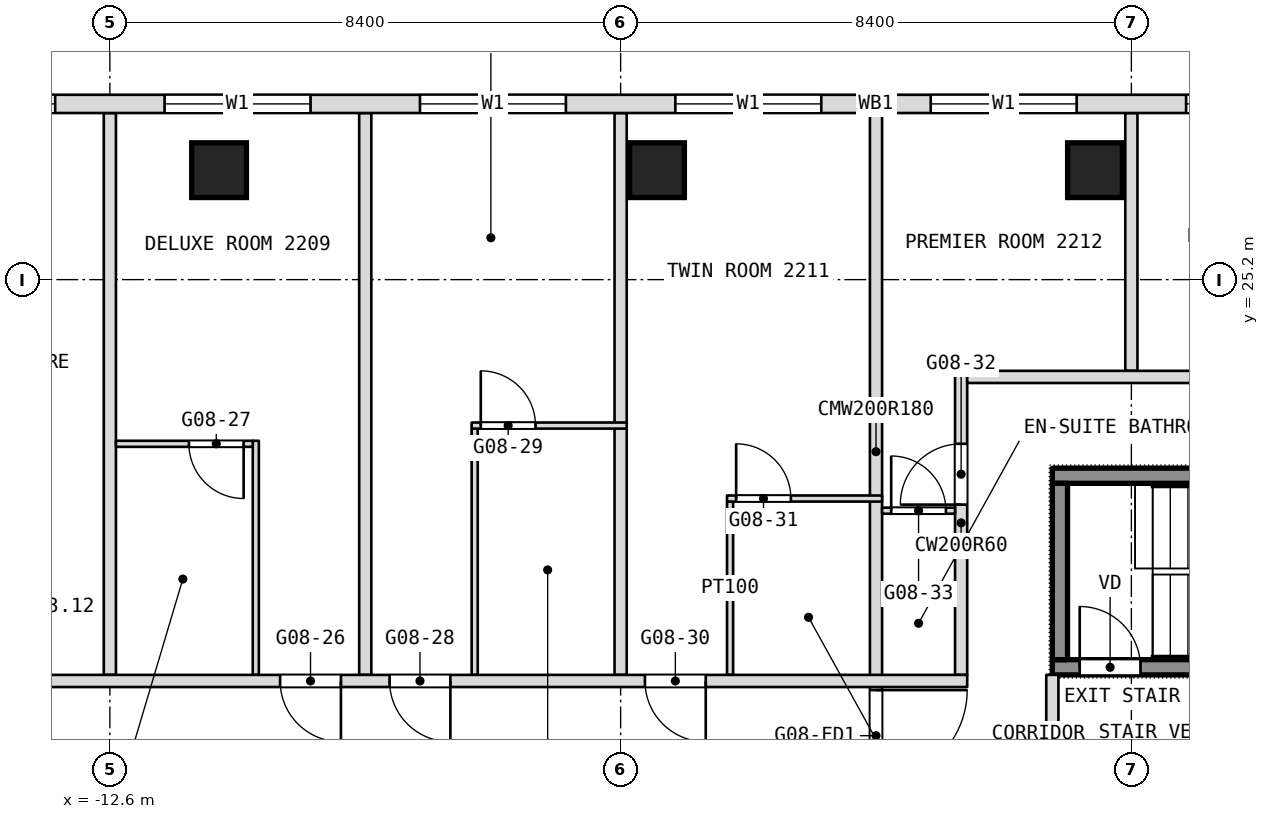
"""IFC4 building model, lengths in metres.
Left out: names, types, materials, properties, quantities, classifications, styles, units other than length and angle.
Written with IfcOpenShell. Run it as: python <this file> out.ifc"""

import sys

from ifc_helpers import new_model, si_unit, direction, frame, frame_2d, origin, origin_2d, place, context, subcontext, project, spatial, rectangle, extrude, element, fill, save


model = new_model("IFC4")
c1 = context("Model", 3, precision=1e-05, world=origin(), true_north=direction((0.0, 1.0)))
c2 = subcontext(c1, "Body", "Model", "MODEL_VIEW")
j1 = project(units=[si_unit("LENGTHUNIT", "METRE"), si_unit("PLANEANGLEUNIT", "RADIAN")], contexts=[c1])
p1 = place(None, origin())
s1 = spatial("IfcSite", under=j1, at=p1, CompositionType="ELEMENT")
p2 = place(p1, origin())
s2 = spatial("IfcBuilding", under=s1, at=p2, CompositionType="ELEMENT")
p3 = place(p2, frame((0.0, 0.0, 104.9)))
s3 = spatial("IfcBuildingStorey", under=s2, at=p3, CompositionType="ELEMENT", Elevation=104.9)
for number, where, z_axis, x_axis in (
    (1, (-10.804, 27.0, 0.0), (0.0, 0.0, 1.0), (1.0, 0.0, 0.0)),
    (2, (-3.601, 27.0, 0.0), (0.0, 0.0, 1.0), (1.0, 0.0, 0.0)),
    (3, (3.601, 27.0, 0.0), (0.0, 0.0, 1.0), (1.0, 0.0, 0.0)),
):
    element("IfcColumn", number, at=place(p3, frame(where, z_axis=z_axis, x_axis=x_axis)), inside=s3, PredefinedType="COLUMN", context=c2, shape_type="SweptSolid", body=[
        extrude(rectangle(XDim=0.9, YDim=0.9, at=origin_2d()), origin(), (0.0, 0.0, 1.0), 3.6),
    ])
p4 = place(p3, frame((4.2, 23.7, 0.0), z_axis=(0.0, 0.0, 1.0), x_axis=(0.0, 1.0, 0.0)))
e4 = element("IfcWall", 4, at=p4, inside=s3, PredefinedType="PARTITIONING", context=c2, shape_type="SweptSolid", body=[
    extrude(rectangle(XDim=4.24, YDim=0.2, at=frame_2d((2.12, 0.0))), origin(), (0.0, 0.0, 1.0), 3.34),
])
p5 = place(p3, frame((2.9, 16.9, 0.0), z_axis=(0.0, 0.0, 1.0), x_axis=(0.0, 1.0, 0.0)))
e5 = element("IfcWall", 5, at=p5, inside=s3, PredefinedType="PARTITIONING", context=c2, shape_type="SweptSolid", body=[
    extrude(rectangle(XDim=1.8, YDim=0.2, at=frame_2d((0.9, 0.0))), origin(), (0.0, 0.0, 1.0), 3.34),
])
p6 = place(p3, frame((1.4, 18.7, 0.0), z_axis=(0.0, 0.0, 1.0), x_axis=(0.0, 1.0, 0.0)))
e6 = element("IfcWall", 6, at=p6, inside=s3, PredefinedType="PARTITIONING", context=c2, shape_type="SweptSolid", body=[
    extrude(rectangle(XDim=5.0, YDim=0.2, at=frame_2d((2.5, 0.0))), origin(), (0.0, 0.0, 1.0), 3.34),
])
p7 = place(p6, frame((2.8, 0.0, 0.0)))
e7 = element("IfcOpeningElement", 7, at=p7, cuts=e6, PredefinedType="OPENING", context=c2, shape_type="SweptSolid", body=[
    extrude(rectangle(XDim=1.0, YDim=2.1, at=frame_2d((0.5, 1.05))), frame((0.0, 0.1, 0.0), z_axis=(0.0, -1.0, 0.0), x_axis=(1.0, 0.0, 0.0)), (0.0, 0.0, 1.0), 0.2),
])
p8 = place(p3, frame((0.0, 16.8, 0.0), z_axis=(0.0, 0.0, 1.0), x_axis=(0.0, 1.0, 0.0)))
e8 = element("IfcWall", 8, at=p8, inside=s3, PredefinedType="PARTITIONING", context=c2, shape_type="SweptSolid", body=[
    extrude(rectangle(XDim=11.14, YDim=0.2, at=frame_2d((5.57, 0.0))), origin(), (0.0, 0.0, 1.0), 3.34),
])
p9 = place(p8, frame((0.15, 0.0, 0.0)))
e9 = element("IfcOpeningElement", 9, at=p9, cuts=e8, PredefinedType="OPENING", context=c2, shape_type="SweptSolid", body=[
    extrude(rectangle(XDim=1.5, YDim=2.1, at=frame_2d((0.75, 1.05))), frame((0.0, 0.1, 0.0), z_axis=(0.0, -1.0, 0.0), x_axis=(1.0, 0.0, 0.0)), (0.0, 0.0, 1.0), 0.2),
])
p10 = place(p3, frame((-2.4, 18.7, 0.0), z_axis=(0.0, 0.0, 1.0), x_axis=(0.0, 1.0, 0.0)))
e10 = element("IfcWall", 10, at=p10, inside=s3, PredefinedType="PARTITIONING", context=c2, shape_type="SweptSolid", body=[
    extrude(rectangle(XDim=2.85, YDim=0.1, at=frame_2d((1.425, 0.0))), origin(), (0.0, 0.0, 1.0), 3.34),
])
p11 = place(p3, frame((-4.2, 18.7, 0.0), z_axis=(0.0, 0.0, 1.0), x_axis=(0.0, 1.0, 0.0)))
e11 = element("IfcWall", 11, at=p11, inside=s3, PredefinedType="PARTITIONING", context=c2, shape_type="SweptSolid", body=[
    extrude(rectangle(XDim=9.24, YDim=0.2, at=frame_2d((4.62, 0.0))), origin(), (0.0, 0.0, 1.0), 3.34),
])
p12 = place(p3, frame((-6.6, 18.7, 0.0), z_axis=(0.0, 0.0, 1.0), x_axis=(0.0, 1.0, 0.0)))
e12 = element("IfcWall", 12, at=p12, inside=s3, PredefinedType="PARTITIONING", context=c2, shape_type="SweptSolid", body=[
    extrude(rectangle(XDim=4.05, YDim=0.1, at=frame_2d((2.025, 0.0))), origin(), (0.0, 0.0, 1.0), 3.34),
])
p13 = place(p3, frame((-8.4, 18.7, 0.0), z_axis=(0.0, 0.0, 1.0), x_axis=(0.0, 1.0, 0.0)))
e13 = element("IfcWall", 13, at=p13, inside=s3, PredefinedType="PARTITIONING", context=c2, shape_type="SweptSolid", body=[
    extrude(rectangle(XDim=9.24, YDim=0.2, at=frame_2d((4.62, 0.0))), origin(), (0.0, 0.0, 1.0), 3.34),
])
p14 = place(p3, frame((-10.2, 18.7, 0.0), z_axis=(0.0, 0.0, 1.0), x_axis=(0.0, 1.0, 0.0)))
e14 = element("IfcWall", 14, at=p14, inside=s3, PredefinedType="PARTITIONING", context=c2, shape_type="SweptSolid", body=[
    extrude(rectangle(XDim=3.85, YDim=0.1, at=frame_2d((1.925, 0.0))), origin(), (0.0, 0.0, 1.0), 3.34),
])
p15 = place(p3, frame((-12.6, 18.7, 0.0), z_axis=(0.0, 0.0, 1.0), x_axis=(0.0, 1.0, 0.0)))
e15 = element("IfcWall", 15, at=p15, inside=s3, PredefinedType="PARTITIONING", context=c2, shape_type="SweptSolid", body=[
    extrude(rectangle(XDim=9.24, YDim=0.2, at=frame_2d((4.62, 0.0))), origin(), (0.0, 0.0, 1.0), 3.34),
])
p16 = place(p3, frame((-16.9, 18.6, 0.0), z_axis=(0.0, 0.0, 1.0), x_axis=(1.0, 0.0, 0.0)))
e16 = element("IfcWall", 16, at=p16, inside=s3, PredefinedType="PARTITIONING", context=c2, shape_type="SweptSolid", body=[
    extrude(rectangle(XDim=18.4, YDim=0.2, at=frame_2d((9.2, 0.0))), origin(), (0.0, 0.0, 1.0), 3.34),
])
p17 = place(p16, frame((1.7, 0.0, 0.0)))
e17 = element("IfcOpeningElement", 17, at=p17, cuts=e16, PredefinedType="OPENING", context=c2, shape_type="SweptSolid", body=[
    extrude(rectangle(XDim=1.0, YDim=2.1, at=frame_2d((0.5, 1.05))), frame((0.0, 0.1, 0.0), z_axis=(0.0, -1.0, 0.0), x_axis=(1.0, 0.0, 0.0)), (0.0, 0.0, 1.0), 0.2),
])
p18 = place(p16, frame((7.1, 0.0, 0.0)))
e18 = element("IfcOpeningElement", 18, at=p18, cuts=e16, PredefinedType="OPENING", context=c2, shape_type="SweptSolid", body=[
    extrude(rectangle(XDim=1.0, YDim=2.1, at=frame_2d((0.5, 1.05))), frame((0.0, 0.1, 0.0), z_axis=(0.0, -1.0, 0.0), x_axis=(1.0, 0.0, 0.0)), (0.0, 0.0, 1.0), 0.2),
])
p19 = place(p16, frame((8.9, 0.0, 0.0)))
e19 = element("IfcOpeningElement", 19, at=p19, cuts=e16, PredefinedType="OPENING", context=c2, shape_type="SweptSolid", body=[
    extrude(rectangle(XDim=1.0, YDim=2.1, at=frame_2d((0.5, 1.05))), frame((0.0, 0.1, 0.0), z_axis=(0.0, -1.0, 0.0), x_axis=(1.0, 0.0, 0.0)), (0.0, 0.0, 1.0), 0.2),
])
p20 = place(p16, frame((13.1, 0.0, 0.0)))
e20 = element("IfcOpeningElement", 20, at=p20, cuts=e16, PredefinedType="OPENING", context=c2, shape_type="SweptSolid", body=[
    extrude(rectangle(XDim=1.0, YDim=2.1, at=frame_2d((0.5, 1.05))), frame((0.0, 0.1, 0.0), z_axis=(0.0, -1.0, 0.0), x_axis=(1.0, 0.0, 0.0)), (0.0, 0.0, 1.0), 0.2),
])
p21 = place(p3, frame((0.1, 21.4, 0.0), z_axis=(0.0, 0.0, 1.0), x_axis=(1.0, 0.0, 0.0)))
e21 = element("IfcWall", 21, at=p21, inside=s3, PredefinedType="PARTITIONING", context=c2, shape_type="SweptSolid", body=[
    extrude(rectangle(XDim=1.2, YDim=0.1, at=frame_2d((0.6, 0.0))), origin(), (0.0, 0.0, 1.0), 3.34),
])
p22 = place(p21, frame((0.15, 0.0, 0.0)))
e22 = element("IfcOpeningElement", 22, at=p22, cuts=e21, PredefinedType="OPENING", context=c2, shape_type="SweptSolid", body=[
    extrude(rectangle(XDim=0.9, YDim=2.1, at=frame_2d((0.45, 1.05))), frame((0.0, 0.05, 0.0), z_axis=(0.0, -1.0, 0.0), x_axis=(1.0, 0.0, 0.0)), (0.0, 0.0, 1.0), 0.1),
])
p23 = place(p3, frame((-2.45, 21.6, 0.0), z_axis=(0.0, 0.0, 1.0), x_axis=(1.0, 0.0, 0.0)))
e23 = element("IfcWall", 23, at=p23, inside=s3, PredefinedType="PARTITIONING", context=c2, shape_type="SweptSolid", body=[
    extrude(rectangle(XDim=2.55, YDim=0.1, at=frame_2d((1.275, 0.0))), origin(), (0.0, 0.0, 1.0), 3.34),
])
p24 = place(p23, frame((0.15, 0.0, 0.0)))
e24 = element("IfcOpeningElement", 24, at=p24, cuts=e23, PredefinedType="OPENING", context=c2, shape_type="SweptSolid", body=[
    extrude(rectangle(XDim=0.9, YDim=2.1, at=frame_2d((0.45, 1.05))), frame((0.0, 0.05, 0.0), z_axis=(0.0, -1.0, 0.0), x_axis=(1.0, 0.0, 0.0)), (0.0, 0.0, 1.0), 0.1),
])
p25 = place(p3, frame((-12.5, 22.5, 0.0), z_axis=(0.0, 0.0, 1.0), x_axis=(1.0, 0.0, 0.0)))
e25 = element("IfcWall", 25, at=p25, inside=s3, PredefinedType="PARTITIONING", context=c2, shape_type="SweptSolid", body=[
    extrude(rectangle(XDim=2.25, YDim=0.1, at=frame_2d((1.125, 0.0))), origin(), (0.0, 0.0, 1.0), 3.34),
])
p26 = place(p25, frame((1.2, 0.0, 0.0)))
e26 = element("IfcOpeningElement", 26, at=p26, cuts=e25, PredefinedType="OPENING", context=c2, shape_type="SweptSolid", body=[
    extrude(rectangle(XDim=0.9, YDim=2.1, at=frame_2d((0.45, 1.05))), frame((0.0, 0.05, 0.0), z_axis=(0.0, -1.0, 0.0), x_axis=(1.0, 0.0, 0.0)), (0.0, 0.0, 1.0), 0.1),
])
p27 = place(p3, frame((-6.65, 22.8, 0.0), z_axis=(0.0, 0.0, 1.0), x_axis=(1.0, 0.0, 0.0)))
e27 = element("IfcWall", 27, at=p27, inside=s3, PredefinedType="PARTITIONING", context=c2, shape_type="SweptSolid", body=[
    extrude(rectangle(XDim=2.55, YDim=0.1, at=frame_2d((1.275, 0.0))), origin(), (0.0, 0.0, 1.0), 3.34),
])
p28 = place(p27, frame((0.15, 0.0, 0.0)))
e28 = element("IfcOpeningElement", 28, at=p28, cuts=e27, PredefinedType="OPENING", context=c2, shape_type="SweptSolid", body=[
    extrude(rectangle(XDim=0.9, YDim=2.1, at=frame_2d((0.45, 1.05))), frame((0.0, 0.05, 0.0), z_axis=(0.0, -1.0, 0.0), x_axis=(1.0, 0.0, 0.0)), (0.0, 0.0, 1.0), 0.1),
])
p29 = place(p3, frame((1.5, 23.6, 0.0), z_axis=(0.0, 0.0, 1.0), x_axis=(1.0, 0.0, 0.0)))
e29 = element("IfcWall", 29, at=p29, inside=s3, PredefinedType="PARTITIONING", context=c2, shape_type="SweptSolid", body=[
    extrude(rectangle(XDim=9.2, YDim=0.2, at=frame_2d((4.6, 0.0))), origin(), (0.0, 0.0, 1.0), 3.34),
])
p30 = place(p29, frame((6.0, 0.0, 0.0)))
e30 = element("IfcOpeningElement", 30, at=p30, cuts=e29, PredefinedType="OPENING", context=c2, shape_type="SweptSolid", body=[
    extrude(rectangle(XDim=1.8, YDim=2.1, at=frame_2d((0.9, 1.05))), frame((0.0, 0.1, 0.0), z_axis=(0.0, -1.0, 0.0), x_axis=(1.0, 0.0, 0.0)), (0.0, 0.0, 1.0), 0.2),
])
p31 = place(p3, frame((21.306, 28.09, 0.0), z_axis=(0.0, 0.0, 1.0), x_axis=(-1.0, 0.0, 0.0)))
e31 = element("IfcWall", 31, at=p31, inside=s3, PredefinedType="NOTDEFINED", context=c2, shape_type="SweptSolid", body=[
    extrude(rectangle(XDim=42.612, YDim=0.3, at=frame_2d((21.306, 0.0))), origin(), (0.0, 0.0, 1.0), 3.6),
])
p32 = place(p31, frame((5.406, 0.0, 0.9)))
e32 = element("IfcOpeningElement", 32, at=p32, cuts=e31, PredefinedType="OPENING", context=c2, shape_type="SweptSolid", body=[
    extrude(rectangle(XDim=2.4, YDim=2.1, at=frame_2d((1.2, 1.05))), frame((0.0, 0.15, 0.0), z_axis=(0.0, -1.0, 0.0), x_axis=(1.0, 0.0, 0.0)), (0.0, 0.0, 1.0), 0.3),
])
p33 = place(p31, frame((9.606, 0.0, 0.9)))
e33 = element("IfcOpeningElement", 33, at=p33, cuts=e31, PredefinedType="OPENING", context=c2, shape_type="SweptSolid", body=[
    extrude(rectangle(XDim=2.4, YDim=2.1, at=frame_2d((1.2, 1.05))), frame((0.0, 0.15, 0.0), z_axis=(0.0, -1.0, 0.0), x_axis=(1.0, 0.0, 0.0)), (0.0, 0.0, 1.0), 0.3),
])
p34 = place(p31, frame((13.806, 0.0, 0.9)))
e34 = element("IfcOpeningElement", 34, at=p34, cuts=e31, PredefinedType="OPENING", context=c2, shape_type="SweptSolid", body=[
    extrude(rectangle(XDim=2.4, YDim=2.1, at=frame_2d((1.2, 1.05))), frame((0.0, 0.15, 0.0), z_axis=(0.0, -1.0, 0.0), x_axis=(1.0, 0.0, 0.0)), (0.0, 0.0, 1.0), 0.3),
])
p35 = place(p31, frame((18.006, 0.0, 0.9)))
e35 = element("IfcOpeningElement", 35, at=p35, cuts=e31, PredefinedType="OPENING", context=c2, shape_type="SweptSolid", body=[
    extrude(rectangle(XDim=2.4, YDim=2.1, at=frame_2d((1.2, 1.05))), frame((0.0, 0.15, 0.0), z_axis=(0.0, -1.0, 0.0), x_axis=(1.0, 0.0, 0.0)), (0.0, 0.0, 1.0), 0.3),
])
p36 = place(p31, frame((22.206, 0.0, 0.9)))
e36 = element("IfcOpeningElement", 36, at=p36, cuts=e31, PredefinedType="OPENING", context=c2, shape_type="SweptSolid", body=[
    extrude(rectangle(XDim=2.4, YDim=2.1, at=frame_2d((1.2, 1.05))), frame((0.0, 0.15, 0.0), z_axis=(0.0, -1.0, 0.0), x_axis=(1.0, 0.0, 0.0)), (0.0, 0.0, 1.0), 0.3),
])
p37 = place(p31, frame((26.406, 0.0, 0.9)))
e37 = element("IfcOpeningElement", 37, at=p37, cuts=e31, PredefinedType="OPENING", context=c2, shape_type="SweptSolid", body=[
    extrude(rectangle(XDim=2.4, YDim=2.1, at=frame_2d((1.2, 1.05))), frame((0.0, 0.15, 0.0), z_axis=(0.0, -1.0, 0.0), x_axis=(1.0, 0.0, 0.0)), (0.0, 0.0, 1.0), 0.3),
])
p38 = place(p31, frame((30.606, 0.0, 0.9)))
e38 = element("IfcOpeningElement", 38, at=p38, cuts=e31, PredefinedType="OPENING", context=c2, shape_type="SweptSolid", body=[
    extrude(rectangle(XDim=2.4, YDim=2.1, at=frame_2d((1.2, 1.05))), frame((0.0, 0.15, 0.0), z_axis=(0.0, -1.0, 0.0), x_axis=(1.0, 0.0, 0.0)), (0.0, 0.0, 1.0), 0.3),
])
p39 = place(p31, frame((34.806, 0.0, 0.9)))
e39 = element("IfcOpeningElement", 39, at=p39, cuts=e31, PredefinedType="OPENING", context=c2, shape_type="SweptSolid", body=[
    extrude(rectangle(XDim=2.4, YDim=2.1, at=frame_2d((1.2, 1.05))), frame((0.0, 0.15, 0.0), z_axis=(0.0, -1.0, 0.0), x_axis=(1.0, 0.0, 0.0)), (0.0, 0.0, 1.0), 0.3),
])
p40 = place(p3, frame((2.9, 18.825, 0.1), z_axis=(0.0, 0.0, 1.0), x_axis=(1.0, 0.0, 0.0)))
e40 = element("IfcWall", 40, at=p40, inside=s3, PredefinedType="SHEAR", context=c2, shape_type="SweptSolid", body=[
    extrude(rectangle(XDim=6.2, YDim=0.25, at=frame_2d((3.1, 0.0))), origin(), (0.0, 0.0, 1.0), 3.6),
])
p41 = place(p40, frame((0.45, 0.0, 0.0)))
e41 = element("IfcOpeningElement", 41, at=p41, cuts=e40, PredefinedType="OPENING", context=c2, shape_type="SweptSolid", body=[
    extrude(rectangle(XDim=1.0, YDim=2.1, at=frame_2d((0.5, 1.05))), frame((0.0, 0.125, 0.0), z_axis=(0.0, -1.0, 0.0), x_axis=(1.0, 0.0, 0.0)), (0.0, 0.0, 1.0), 0.25),
])
p42 = place(p3, frame((2.9, 21.975, 0.1), z_axis=(0.0, 0.0, 1.0), x_axis=(1.0, 0.0, 0.0)))
e42 = element("IfcWall", 42, at=p42, inside=s3, PredefinedType="SHEAR", context=c2, shape_type="SweptSolid", body=[
    extrude(rectangle(XDim=6.2, YDim=0.25, at=frame_2d((3.1, 0.0))), origin(), (0.0, 0.0, 1.0), 3.6),
])
p43 = place(p3, frame((3.025, 18.95, 0.1), z_axis=(0.0, 0.0, 1.0), x_axis=(0.0, 1.0, 0.0)))
e43 = element("IfcWall", 43, at=p43, inside=s3, PredefinedType="SHEAR", context=c2, shape_type="SweptSolid", body=[
    extrude(rectangle(XDim=2.9, YDim=0.25, at=frame_2d((1.45, 0.0))), origin(), (0.0, 0.0, 1.0), 3.6),
])
p44 = place(p7, origin())
e44 = element("IfcDoor", 44, at=p44, inside=s3, OperationType="SINGLE_SWING_RIGHT", PredefinedType="DOOR", context=c2, shape_type="SweptSolid", body=[
    extrude(rectangle(XDim=1.0, YDim=2.1, at=frame_2d((0.5, 1.05))), frame((0.0, 0.025, 0.0), z_axis=(0.0, -1.0, 0.0), x_axis=(1.0, 0.0, 0.0)), (0.0, 0.0, 1.0), 0.05),
])
fill(e7, e44)
p45 = place(p18, origin())
e45 = element("IfcDoor", 45, at=p45, inside=s3, OperationType="SINGLE_SWING_LEFT", PredefinedType="DOOR", context=c2, shape_type="SweptSolid", body=[
    extrude(rectangle(XDim=1.0, YDim=2.1, at=frame_2d((0.5, 1.05))), frame((0.0, 0.025, 0.0), z_axis=(0.0, -1.0, 0.0), x_axis=(1.0, 0.0, 0.0)), (0.0, 0.0, 1.0), 0.05),
])
fill(e18, e45)
p46 = place(p19, origin())
e46 = element("IfcDoor", 46, at=p46, inside=s3, OperationType="SINGLE_SWING_LEFT", PredefinedType="DOOR", context=c2, shape_type="SweptSolid", body=[
    extrude(rectangle(XDim=1.0, YDim=2.1, at=frame_2d((0.5, 1.05))), frame((0.0, 0.025, 0.0), z_axis=(0.0, -1.0, 0.0), x_axis=(1.0, 0.0, 0.0)), (0.0, 0.0, 1.0), 0.05),
])
fill(e19, e46)
p47 = place(p20, origin())
e47 = element("IfcDoor", 47, at=p47, inside=s3, OperationType="SINGLE_SWING_LEFT", PredefinedType="DOOR", context=c2, shape_type="SweptSolid", body=[
    extrude(rectangle(XDim=1.0, YDim=2.1, at=frame_2d((0.5, 1.05))), frame((0.0, 0.025, 0.0), z_axis=(0.0, -1.0, 0.0), x_axis=(1.0, 0.0, 0.0)), (0.0, 0.0, 1.0), 0.05),
])
fill(e20, e47)
p48 = place(p22, origin())
e48 = element("IfcDoor", 48, at=p48, inside=s3, OperationType="SINGLE_SWING_LEFT", PredefinedType="DOOR", context=c2, shape_type="SweptSolid", body=[
    extrude(rectangle(XDim=0.9, YDim=2.1, at=frame_2d((0.45, 1.05))), frame((0.0, 0.025, 0.0), z_axis=(0.0, -1.0, 0.0), x_axis=(1.0, 0.0, 0.0)), (0.0, 0.0, 1.0), 0.05),
])
fill(e22, e48)
p49 = place(p24, origin())
e49 = element("IfcDoor", 49, at=p49, inside=s3, OperationType="SINGLE_SWING_RIGHT", PredefinedType="DOOR", context=c2, shape_type="SweptSolid", body=[
    extrude(rectangle(XDim=0.9, YDim=2.1, at=frame_2d((0.45, 1.05))), frame((0.0, 0.025, 0.0), z_axis=(0.0, -1.0, 0.0), x_axis=(1.0, 0.0, 0.0)), (0.0, 0.0, 1.0), 0.05),
])
fill(e24, e49)
p50 = place(p26, origin())
e50 = element("IfcDoor", 50, at=p50, inside=s3, OperationType="SINGLE_SWING_LEFT", PredefinedType="DOOR", context=c2, shape_type="SweptSolid", body=[
    extrude(rectangle(XDim=0.9, YDim=2.1, at=frame_2d((0.45, 1.05))), frame((0.0, 0.025, 0.0), z_axis=(0.0, -1.0, 0.0), x_axis=(1.0, 0.0, 0.0)), (0.0, 0.0, 1.0), 0.05),
])
fill(e26, e50)
p51 = place(p28, origin())
e51 = element("IfcDoor", 51, at=p51, inside=s3, OperationType="SINGLE_SWING_RIGHT", PredefinedType="DOOR", context=c2, shape_type="SweptSolid", body=[
    extrude(rectangle(XDim=0.9, YDim=2.1, at=frame_2d((0.45, 1.05))), frame((0.0, 0.025, 0.0), z_axis=(0.0, -1.0, 0.0), x_axis=(1.0, 0.0, 0.0)), (0.0, 0.0, 1.0), 0.05),
])
fill(e28, e51)
p52 = place(p34, origin())
e52 = element("IfcWindow", 52, at=p52, inside=s3, PartitioningType="SINGLE_PANEL", PredefinedType="WINDOW", context=c2, shape_type="SweptSolid", body=[
    extrude(rectangle(XDim=2.4, YDim=2.1, at=frame_2d((1.2, 1.05))), frame((0.0, 0.03, 0.0), z_axis=(0.0, -1.0, 0.0), x_axis=(1.0, 0.0, 0.0)), (0.0, 0.0, 1.0), 0.06),
])
fill(e34, e52)
p53 = place(p35, origin())
e53 = element("IfcWindow", 53, at=p53, inside=s3, PartitioningType="SINGLE_PANEL", PredefinedType="WINDOW", context=c2, shape_type="SweptSolid", body=[
    extrude(rectangle(XDim=2.4, YDim=2.1, at=frame_2d((1.2, 1.05))), frame((0.0, 0.03, 0.0), z_axis=(0.0, -1.0, 0.0), x_axis=(1.0, 0.0, 0.0)), (0.0, 0.0, 1.0), 0.06),
])
fill(e35, e53)
p54 = place(p36, origin())
e54 = element("IfcWindow", 54, at=p54, inside=s3, PartitioningType="SINGLE_PANEL", PredefinedType="WINDOW", context=c2, shape_type="SweptSolid", body=[
    extrude(rectangle(XDim=2.4, YDim=2.1, at=frame_2d((1.2, 1.05))), frame((0.0, 0.03, 0.0), z_axis=(0.0, -1.0, 0.0), x_axis=(1.0, 0.0, 0.0)), (0.0, 0.0, 1.0), 0.06),
])
fill(e36, e54)
p55 = place(p37, origin())
e55 = element("IfcWindow", 55, at=p55, inside=s3, PartitioningType="SINGLE_PANEL", PredefinedType="WINDOW", context=c2, shape_type="SweptSolid", body=[
    extrude(rectangle(XDim=2.4, YDim=2.1, at=frame_2d((1.2, 1.05))), frame((0.0, 0.03, 0.0), z_axis=(0.0, -1.0, 0.0), x_axis=(1.0, 0.0, 0.0)), (0.0, 0.0, 1.0), 0.06),
])
fill(e37, e55)
p56 = place(p38, origin())
e56 = element("IfcWindow", 56, at=p56, inside=s3, PartitioningType="SINGLE_PANEL", PredefinedType="WINDOW", context=c2, shape_type="SweptSolid", body=[
    extrude(rectangle(XDim=2.4, YDim=2.1, at=frame_2d((1.2, 1.05))), frame((0.0, 0.03, 0.0), z_axis=(0.0, -1.0, 0.0), x_axis=(1.0, 0.0, 0.0)), (0.0, 0.0, 1.0), 0.06),
])
fill(e38, e56)
p57 = place(p39, origin())
e57 = element("IfcWindow", 57, at=p57, inside=s3, PartitioningType="SINGLE_PANEL", PredefinedType="WINDOW", context=c2, shape_type="SweptSolid", body=[
    extrude(rectangle(XDim=2.4, YDim=2.1, at=frame_2d((1.2, 1.05))), frame((0.0, 0.03, 0.0), z_axis=(0.0, -1.0, 0.0), x_axis=(1.0, 0.0, 0.0)), (0.0, 0.0, 1.0), 0.06),
])
fill(e39, e57)
p58 = place(p41, origin())
e58 = element("IfcDoor", 58, at=p58, inside=s3, OperationType="SINGLE_SWING_LEFT", PredefinedType="DOOR", context=c2, shape_type="SweptSolid", body=[
    extrude(rectangle(XDim=1.0, YDim=2.1, at=frame_2d((0.5, 1.05))), frame((0.0, 0.025, 0.0), z_axis=(0.0, -1.0, 0.0), x_axis=(1.0, 0.0, 0.0)), (0.0, 0.0, 1.0), 0.05),
])
fill(e41, e58)
p59 = place(p9, origin())
e59 = element("IfcDoor", 59, at=p59, inside=s3, OperationType="DOUBLE_DOOR_DOUBLE_SWING", PredefinedType="DOOR", context=c2, shape_type="SweptSolid", body=[
    extrude(rectangle(XDim=1.5, YDim=2.1, at=frame_2d((0.75, 1.05))), frame((0.0, 0.025, 0.0), z_axis=(0.0, -1.0, 0.0), x_axis=(1.0, 0.0, 0.0)), (0.0, 0.0, 1.0), 0.05),
])
fill(e9, e59)
save(model, sys.argv[1])
